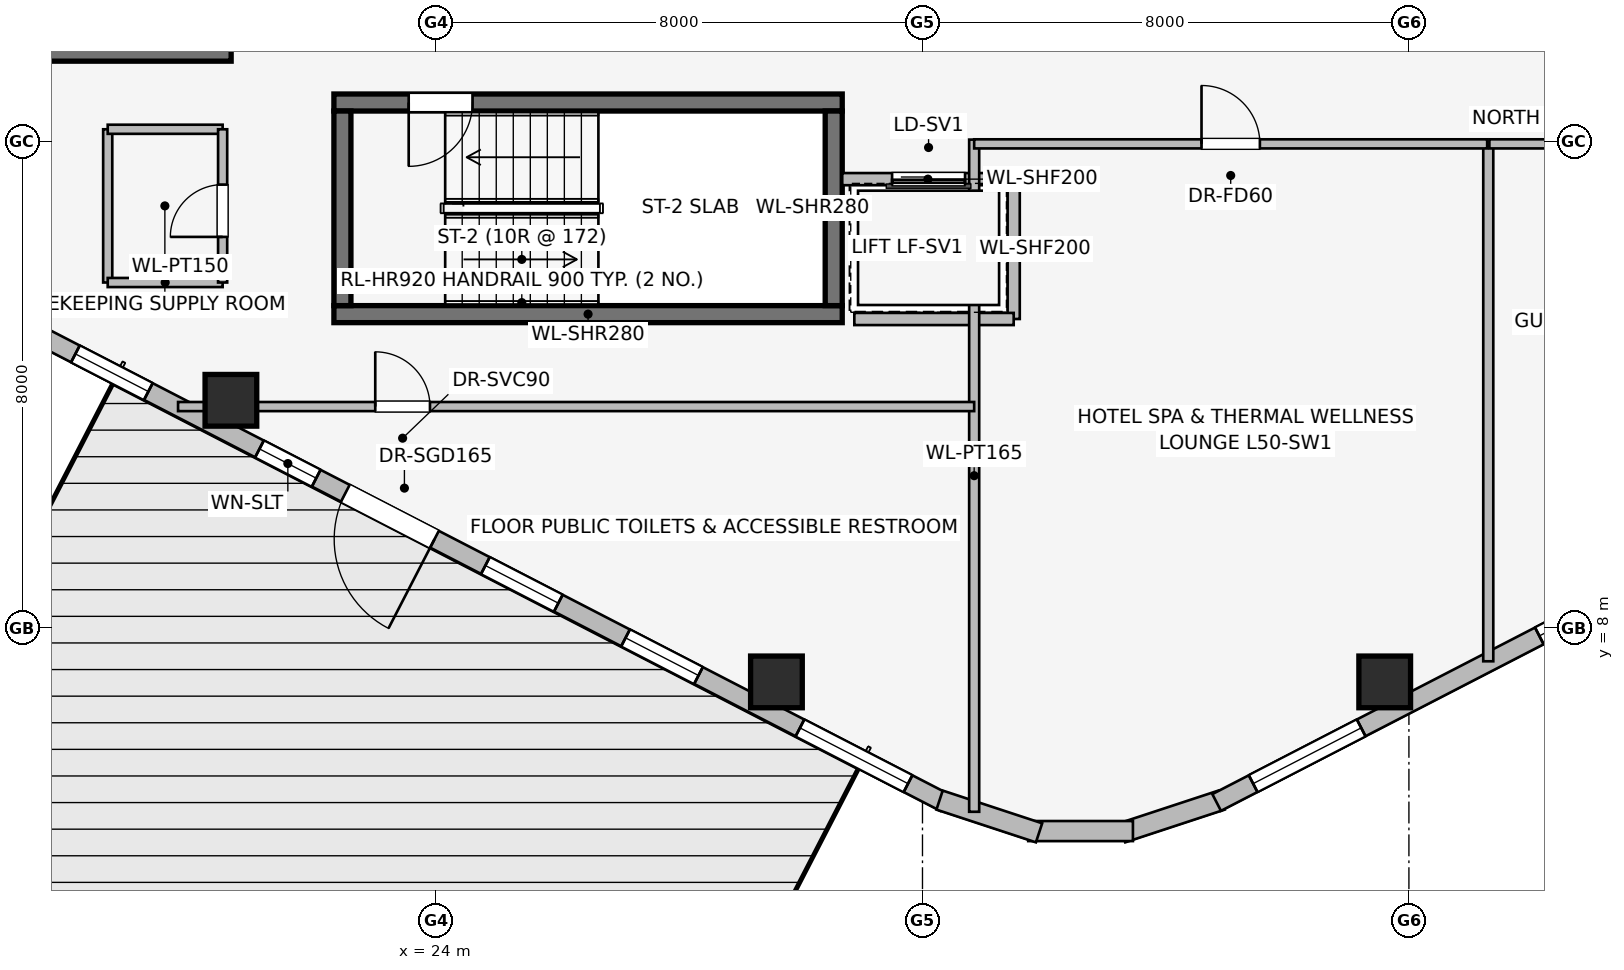
"""IFC4 building model, lengths in metres.
Left out: names, types, materials, properties, quantities, classifications, styles, units other than length and angle.
Written with IfcOpenShell. Run it as: python <this file> out.ifc"""

import sys

from ifc_helpers import new_model, si_unit, direction, frame, frame_2d, origin, origin_2d, place, context, subcontext, project, spatial, rectangle, extrude, element, fill, save


model = new_model("IFC4")
c1 = context("Model", 3, precision=1e-05, world=origin(), true_north=direction((0.0, 1.0)))
c2 = subcontext(c1, "Body", "Model", "MODEL_VIEW")
j1 = project(units=[si_unit("LENGTHUNIT", "METRE"), si_unit("PLANEANGLEUNIT", "RADIAN")], contexts=[c1])
p1 = place(None, origin())
s1 = spatial("IfcSite", under=j1, at=p1, CompositionType="ELEMENT")
p2 = place(p1, origin())
s2 = spatial("IfcBuilding", under=s1, at=p2, CompositionType="ELEMENT")
p3 = place(p2, frame((0.0, 0.0, 184.35)))
s3 = spatial("IfcBuildingStorey", under=s2, at=p3, CompositionType="ELEMENT", Elevation=184.35)
p4 = place(p3, frame((16.87, 17.46, 0.0), z_axis=(0.0, 0.0, 1.0), x_axis=(1.0, 0.0, 0.0)))
e1 = element("IfcWall", 1, at=p4, inside=s3, PredefinedType="SHEAR", context=c2, shape_type="SweptSolid", body=[
    extrude(rectangle(XDim=3.76, YDim=0.28, at=frame_2d((1.88, 0.0))), origin(), (0.0, 0.0, 1.0), 3.45),
])
p5 = place(p3, frame((22.32, 13.16, 0.0), z_axis=(0.0, 0.0, 1.0), x_axis=(1.0, 0.0, 0.0)))
e2 = element("IfcWall", 2, at=p5, inside=s3, PredefinedType="SHEAR", context=c2, shape_type="SweptSolid", body=[
    extrude(rectangle(XDim=8.36, YDim=0.28, at=frame_2d((4.18, 0.0))), origin(), (0.0, 0.0, 1.0), 3.45),
])
p6 = place(p3, frame((30.68, 16.64, 0.0), z_axis=(0.0, 0.0, 1.0), x_axis=(-1.0, 0.0, 0.0)))
e3 = element("IfcWall", 3, at=p6, inside=s3, PredefinedType="SHEAR", context=c2, shape_type="SweptSolid", body=[
    extrude(rectangle(XDim=8.36, YDim=0.28, at=frame_2d((4.18, 0.0))), origin(), (0.0, 0.0, 1.0), 3.45),
])
p7 = place(p6, frame((6.08, 0.0, 0.0)))
e4 = element("IfcOpeningElement", 4, at=p7, cuts=e3, PredefinedType="OPENING", context=c2, shape_type="SweptSolid", body=[
    extrude(rectangle(XDim=1.05, YDim=2.0, at=frame_2d((0.525, 1.0))), frame((0.0, 0.15, 0.0), z_axis=(0.0, -1.0, 0.0), x_axis=(1.0, 0.0, 0.0)), (0.0, 0.0, 1.0), 0.3),
])
for number, where, z_axis, x_axis in (
    (5, (22.46, 16.5, 0.0), (0.0, 0.0, 1.0), (0.0, -1.0, 0.0)),
    (6, (30.54, 13.3, 0.0), (0.0, 0.0, 1.0), (0.0, 1.0, 0.0)),
):
    element("IfcWall", number, at=place(p3, frame(where, z_axis=z_axis, x_axis=x_axis)), inside=s3, PredefinedType="SHEAR", context=c2, shape_type="SweptSolid", body=[
        extrude(rectangle(XDim=3.2, YDim=0.28, at=frame_2d((1.6, 0.0))), origin(), (0.0, 0.0, 1.0), 3.45),
    ])
for number, where, z_axis, x_axis in (
    (7, (20.626, 11.743, 0.0), (0.0, 0.0, 1.0), (1.0, 0.0, 0.0)),
    (8, (29.598, 7.112, 0.0), (0.0, 0.0, 1.0), (1.0, 0.0, 0.0)),
    (9, (39.602, 7.112, 0.0), (0.0, 0.0, 1.0), (1.0, 0.0, 0.0)),
):
    element("IfcColumn", number, at=place(p3, frame(where, z_axis=z_axis, x_axis=x_axis)), inside=s3, PredefinedType="COLUMN", context=c2, shape_type="SweptSolid", body=[
        extrude(rectangle(XDim=0.85, YDim=0.85, at=origin_2d()), origin(), (0.0, 0.0, 1.0), 3.45),
    ])
p8 = place(p3, frame((32.362, 5.129, 0.0), z_axis=(0.0, 0.0, 1.0), x_axis=(-0.888626188278, 0.458632202867, 0.0)))
e10 = element("IfcWall", 10, at=p8, inside=s3, PredefinedType="STANDARD", context=c2, shape_type="SweptSolid", body=[
    extrude(rectangle(XDim=16.828, YDim=0.31, at=frame_2d((8.414, 0.0))), origin(), (0.0, 0.0, 1.0), 2.494),
])
p9 = place(p8, frame((9.439, 0.0, 0.0)))
e11 = element("IfcOpeningElement", 11, at=p9, cuts=e10, PredefinedType="OPENING", context=c2, shape_type="SweptSolid", body=[
    extrude(rectangle(XDim=1.65, YDim=2.25, at=frame_2d((0.825, 1.125))), frame((0.0, 0.165, 0.0), z_axis=(0.0, -1.0, 0.0), x_axis=(1.0, 0.0, 0.0)), (0.0, 0.0, 1.0), 0.33),
])
p10 = place(p8, frame((0.675, 0.0, 0.75)))
e12 = element("IfcOpeningElement", 12, at=p10, cuts=e10, PredefinedType="OPENING", context=c2, shape_type="SweptSolid", body=[
    extrude(rectangle(XDim=2.0, YDim=1.5, at=frame_2d((1.0, 0.75))), frame((0.0, 0.165, 0.0), z_axis=(0.0, -1.0, 0.0), x_axis=(1.0, 0.0, 0.0)), (0.0, 0.0, 1.0), 0.33),
])
p11 = place(p8, frame((4.553, 0.0, 0.75)))
e13 = element("IfcOpeningElement", 13, at=p11, cuts=e10, PredefinedType="OPENING", context=c2, shape_type="SweptSolid", body=[
    extrude(rectangle(XDim=1.35, YDim=1.45, at=frame_2d((0.675, 0.725))), frame((0.0, 0.165, 0.0), z_axis=(0.0, -1.0, 0.0), x_axis=(1.0, 0.0, 0.0)), (0.0, 0.0, 1.0), 0.33),
])
p12 = place(p8, frame((7.147, 0.0, 0.75)))
e14 = element("IfcOpeningElement", 14, at=p12, cuts=e10, PredefinedType="OPENING", context=c2, shape_type="SweptSolid", body=[
    extrude(rectangle(XDim=1.35, YDim=1.45, at=frame_2d((0.675, 0.725))), frame((0.0, 0.165, 0.0), z_axis=(0.0, -1.0, 0.0), x_axis=(1.0, 0.0, 0.0)), (0.0, 0.0, 1.0), 0.33),
])
p13 = place(p8, frame((11.628, 0.0, 0.75)))
e15 = element("IfcOpeningElement", 15, at=p13, cuts=e10, PredefinedType="OPENING", context=c2, shape_type="SweptSolid", body=[
    extrude(rectangle(XDim=1.05, YDim=1.4, at=frame_2d((0.525, 0.7))), frame((0.0, 0.165, 0.0), z_axis=(0.0, -1.0, 0.0), x_axis=(1.0, 0.0, 0.0)), (0.0, 0.0, 1.0), 0.33),
])
p14 = place(p8, frame((14.735, 0.0, 0.75)))
e16 = element("IfcOpeningElement", 16, at=p14, cuts=e10, PredefinedType="OPENING", context=c2, shape_type="SweptSolid", body=[
    extrude(rectangle(XDim=1.35, YDim=1.45, at=frame_2d((0.675, 0.725))), frame((0.0, 0.165, 0.0), z_axis=(0.0, -1.0, 0.0), x_axis=(1.0, 0.0, 0.0)), (0.0, 0.0, 1.0), 0.33),
])
p15 = place(p3, frame((36.919, 5.168, 0.0), z_axis=(0.0, 0.0, 1.0), x_axis=(-0.949937416267, -0.312440242569, 0.0)))
e17 = element("IfcWall", 17, at=p15, inside=s3, PredefinedType="STANDARD", context=c2, shape_type="SweptSolid", body=[
    extrude(rectangle(XDim=1.722, YDim=0.33, at=frame_2d((0.861, 0.0))), origin(), (0.0, 0.0, 1.0), 3.19),
])
p16 = place(p3, frame((35.461, 4.659, 0.0), z_axis=(0.0, 0.0, 1.0), x_axis=(-1.0, 0.0, 0.0)))
e18 = element("IfcWall", 18, at=p16, inside=s3, PredefinedType="STANDARD", context=c2, shape_type="SweptSolid", body=[
    extrude(rectangle(XDim=1.722, YDim=0.33, at=frame_2d((0.861, 0.0))), origin(), (0.0, 0.0, 1.0), 3.19),
])
p17 = place(p3, frame((33.917, 4.63, 0.0), z_axis=(0.0, 0.0, 1.0), x_axis=(-0.949937416267, 0.312440242569, 0.0)))
e19 = element("IfcWall", 19, at=p17, inside=s3, PredefinedType="STANDARD", context=c2, shape_type="SweptSolid", body=[
    extrude(rectangle(XDim=1.722, YDim=0.33, at=frame_2d((0.861, 0.0))), origin(), (0.0, 0.0, 1.0), 3.19),
])
p18 = place(p3, frame((51.792, 12.847, 0.0), z_axis=(0.0, 0.0, 1.0), x_axis=(-0.888626188278, -0.458632202867, 0.0)))
e20 = element("IfcWall", 20, at=p18, inside=s3, PredefinedType="STANDARD", context=c2, shape_type="SweptSolid", body=[
    extrude(rectangle(XDim=16.828, YDim=0.31, at=frame_2d((8.414, 0.0))), origin(), (0.0, 0.0, 1.0), 3.19),
])
p19 = place(p18, frame((0.675, 0.0, 0.75)))
e21 = element("IfcOpeningElement", 21, at=p19, cuts=e20, PredefinedType="OPENING", context=c2, shape_type="SweptSolid", body=[
    extrude(rectangle(XDim=2.0, YDim=1.5, at=frame_2d((1.0, 0.75))), frame((0.0, 0.165, 0.0), z_axis=(0.0, -1.0, 0.0), x_axis=(1.0, 0.0, 0.0)), (0.0, 0.0, 1.0), 0.33),
])
p20 = place(p18, frame((4.506, 0.0, 0.75)))
e22 = element("IfcOpeningElement", 22, at=p20, cuts=e20, PredefinedType="OPENING", context=c2, shape_type="SweptSolid", body=[
    extrude(rectangle(XDim=1.35, YDim=1.45, at=frame_2d((0.675, 0.725))), frame((0.0, 0.165, 0.0), z_axis=(0.0, -1.0, 0.0), x_axis=(1.0, 0.0, 0.0)), (0.0, 0.0, 1.0), 0.33),
])
p21 = place(p18, frame((7.006, 0.0, 0.75)))
e23 = element("IfcOpeningElement", 23, at=p21, cuts=e20, PredefinedType="OPENING", context=c2, shape_type="SweptSolid", body=[
    extrude(rectangle(XDim=1.35, YDim=1.45, at=frame_2d((0.675, 0.725))), frame((0.0, 0.165, 0.0), z_axis=(0.0, -1.0, 0.0), x_axis=(1.0, 0.0, 0.0)), (0.0, 0.0, 1.0), 0.33),
])
p22 = place(p18, frame((9.506, 0.0, 0.75)))
e24 = element("IfcOpeningElement", 24, at=p22, cuts=e20, PredefinedType="OPENING", context=c2, shape_type="SweptSolid", body=[
    extrude(rectangle(XDim=1.35, YDim=1.45, at=frame_2d((0.675, 0.725))), frame((0.0, 0.165, 0.0), z_axis=(0.0, -1.0, 0.0), x_axis=(1.0, 0.0, 0.0)), (0.0, 0.0, 1.0), 0.33),
])
p23 = place(p18, frame((14.153, 0.0, 0.75)))
e25 = element("IfcOpeningElement", 25, at=p23, cuts=e20, PredefinedType="OPENING", context=c2, shape_type="SweptSolid", body=[
    extrude(rectangle(XDim=2.0, YDim=1.5, at=frame_2d((1.0, 0.75))), frame((0.0, 0.165, 0.0), z_axis=(0.0, -1.0, 0.0), x_axis=(1.0, 0.0, 0.0)), (0.0, 0.0, 1.0), 0.33),
])
p24 = place(p3, frame((33.5, 15.38, 0.0), z_axis=(0.0, 0.0, 1.0), x_axis=(-1.0, 0.0, 0.0)))
e26 = element("IfcWall", 26, at=p24, inside=s3, PredefinedType="PARTITIONING", context=c2, shape_type="SweptSolid", body=[
    extrude(rectangle(XDim=2.82, YDim=0.2, at=frame_2d((1.41, 0.0))), origin(), (0.0, 0.0, 1.0), 3.19),
])
p25 = place(p24, frame((0.8, 0.0, 0.0)))
e27 = element("IfcOpeningElement", 27, at=p25, cuts=e26, PredefinedType="OPENING", context=c2, shape_type="SweptSolid", body=[
    extrude(rectangle(XDim=1.2, YDim=2.2, at=frame_2d((0.6, 1.1))), frame((0.0, 0.11, 0.0), z_axis=(0.0, -1.0, 0.0), x_axis=(1.0, 0.0, 0.0)), (0.0, 0.0, 1.0), 0.22),
])
p26 = place(p3, frame((33.5, 13.08, 0.0), z_axis=(0.0, 0.0, 1.0), x_axis=(0.0, 1.0, 0.0)))
e28 = element("IfcWall", 28, at=p26, inside=s3, PredefinedType="PARTITIONING", context=c2, shape_type="SweptSolid", body=[
    extrude(rectangle(XDim=2.3, YDim=0.2, at=frame_2d((1.15, 0.0))), origin(), (0.0, 0.0, 1.0), 3.19),
])
p27 = place(p3, frame((30.879, 13.08, 0.0), z_axis=(0.0, 0.0, 1.0), x_axis=(1.0, 0.0, 0.0)))
e29 = element("IfcWall", 29, at=p27, inside=s3, PredefinedType="PARTITIONING", context=c2, shape_type="SweptSolid", body=[
    extrude(rectangle(XDim=2.621, YDim=0.2, at=frame_2d((1.311, 0.0))), origin(), (0.0, 0.0, 1.0), 3.19),
])
p28 = place(p3, frame((18.6, 16.2, 0.0), z_axis=(0.0, 0.0, 1.0), x_axis=(0.0, -1.0, 0.0)))
e30 = element("IfcWall", 30, at=p28, inside=s3, PredefinedType="PARTITIONING", context=c2, shape_type="SweptSolid", body=[
    extrude(rectangle(XDim=2.52, YDim=0.15, at=frame_2d((1.26, 0.0))), origin(), (0.0, 0.0, 1.0), 3.19),
])
for number, where, z_axis, x_axis in (
    (31, (18.6, 13.68, 0.0), (0.0, 0.0, 1.0), (1.0, 0.0, 0.0)),
    (32, (18.6, 16.2, 0.0), (0.0, 0.0, 1.0), (1.0, 0.0, 0.0)),
):
    element("IfcWall", number, at=place(p3, frame(where, z_axis=z_axis, x_axis=x_axis)), inside=s3, PredefinedType="PARTITIONING", context=c2, shape_type="SweptSolid", body=[
        extrude(rectangle(XDim=1.89, YDim=0.15, at=frame_2d((0.945, 0.0))), origin(), (0.0, 0.0, 1.0), 3.19),
    ])
p29 = place(p3, frame((20.49, 13.68, 0.0), z_axis=(0.0, 0.0, 1.0), x_axis=(0.0, 1.0, 0.0)))
e33 = element("IfcWall", 33, at=p29, inside=s3, PredefinedType="PARTITIONING", context=c2, shape_type="SweptSolid", body=[
    extrude(rectangle(XDim=2.52, YDim=0.15, at=frame_2d((1.26, 0.0))), origin(), (0.0, 0.0, 1.0), 3.19),
])
p30 = place(p29, frame((0.75, 0.0, 0.0)))
e34 = element("IfcOpeningElement", 34, at=p30, cuts=e33, PredefinedType="OPENING", context=c2, shape_type="SweptSolid", body=[
    extrude(rectangle(XDim=0.86, YDim=2.0, at=frame_2d((0.43, 1.0))), frame((0.0, 0.085, 0.0), z_axis=(0.0, -1.0, 0.0), x_axis=(1.0, 0.0, 0.0)), (0.0, 0.0, 1.0), 0.17),
])
p31 = place(p3, frame((32.85, 4.976, 0.0), z_axis=(0.0, 0.0, 1.0), x_axis=(0.0, 1.0, 0.0)))
e35 = element("IfcWall", 35, at=p31, inside=s3, PredefinedType="PARTITIONING", context=c2, shape_type="SweptSolid", body=[
    extrude(rectangle(XDim=11.054, YDim=0.165, at=frame_2d((5.527, 0.0))), origin(), (0.0, 0.0, 1.0), 3.19),
])
p32 = place(p3, frame((19.757, 11.64, 0.0), z_axis=(0.0, 0.0, 1.0), x_axis=(1.0, 0.0, 0.0)))
e36 = element("IfcWall", 36, at=p32, inside=s3, PredefinedType="PARTITIONING", context=c2, shape_type="SweptSolid", body=[
    extrude(rectangle(XDim=13.093, YDim=0.15, at=frame_2d((6.546, 0.0))), origin(), (0.0, 0.0, 1.0), 3.19),
])
p33 = place(p32, frame((3.243, 0.0, 0.0)))
e37 = element("IfcOpeningElement", 37, at=p33, cuts=e36, PredefinedType="OPENING", context=c2, shape_type="SweptSolid", body=[
    extrude(rectangle(XDim=0.9, YDim=2.0, at=frame_2d((0.45, 1.0))), frame((0.0, 0.085, 0.0), z_axis=(0.0, -1.0, 0.0), x_axis=(1.0, 0.0, 0.0)), (0.0, 0.0, 1.0), 0.17),
])
p34 = place(p3, frame((41.305, 7.451, 0.0), z_axis=(0.0, 0.0, 1.0), x_axis=(0.0, 1.0, 0.0)))
e38 = element("IfcWall", 38, at=p34, inside=s3, PredefinedType="PARTITIONING", context=c2, shape_type="SweptSolid", body=[
    extrude(rectangle(XDim=8.479, YDim=0.165, at=frame_2d((4.24, 0.0))), origin(), (0.0, 0.0, 1.0), 3.19),
])
p35 = place(p3, frame((32.85, 15.96, 0.0), z_axis=(0.0, 0.0, 1.0), x_axis=(1.0, 0.0, 0.0)))
e39 = element("IfcWall", 39, at=p35, inside=s3, PredefinedType="PARTITIONING", context=c2, shape_type="SweptSolid", body=[
    extrude(rectangle(XDim=8.437, YDim=0.15, at=frame_2d((4.219, 0.0))), origin(), (0.0, 0.0, 1.0), 3.19),
])
p36 = place(p35, frame((3.739, 0.0, 0.0)))
e40 = element("IfcOpeningElement", 40, at=p36, cuts=e39, PredefinedType="OPENING", context=c2, shape_type="SweptSolid", body=[
    extrude(rectangle(XDim=0.96, YDim=2.0, at=frame_2d((0.48, 1.0))), frame((0.0, 0.085, 0.0), z_axis=(0.0, -1.0, 0.0), x_axis=(1.0, 0.0, 0.0)), (0.0, 0.0, 1.0), 0.17),
])
p37 = place(p3, frame((41.323, 15.96, 0.0), z_axis=(0.0, 0.0, 1.0), x_axis=(1.0, 0.0, 0.0)))
e41 = element("IfcWall", 41, at=p37, inside=s3, PredefinedType="PARTITIONING", context=c2, shape_type="SweptSolid", body=[
    extrude(rectangle(XDim=12.74, YDim=0.15, at=frame_2d((6.37, 0.0))), origin(), (0.0, 0.0, 1.0), 3.19),
])
p38 = place(p37, frame((5.959, 0.0, 0.0)))
e42 = element("IfcOpeningElement", 42, at=p38, cuts=e41, PredefinedType="OPENING", context=c2, shape_type="SweptSolid", body=[
    extrude(rectangle(XDim=0.96, YDim=2.0, at=frame_2d((0.48, 1.0))), frame((0.0, 0.085, 0.0), z_axis=(0.0, -1.0, 0.0), x_axis=(1.0, 0.0, 0.0)), (0.0, 0.0, 1.0), 0.17),
])
p39 = place(p9, origin())
e43 = element("IfcDoor", 43, at=p39, inside=s3, OperationType="SINGLE_SWING_LEFT", PredefinedType="DOOR", context=c2, shape_type="SweptSolid", body=[
    extrude(rectangle(XDim=1.65, YDim=2.25, at=frame_2d((0.825, 1.125))), frame((0.0, 0.025, 0.0), z_axis=(0.0, -1.0, 0.0), x_axis=(1.0, 0.0, 0.0)), (0.0, 0.0, 1.0), 0.05),
])
fill(e11, e43)
p40 = place(p10, origin())
e44 = element("IfcWindow", 44, at=p40, inside=s3, PartitioningType="SINGLE_PANEL", PredefinedType="WINDOW", context=c2, shape_type="SweptSolid", body=[
    extrude(rectangle(XDim=2.0, YDim=1.5, at=frame_2d((1.0, 0.75))), frame((0.0, 0.03, 0.0), z_axis=(0.0, -1.0, 0.0), x_axis=(1.0, 0.0, 0.0)), (0.0, 0.0, 1.0), 0.06),
])
fill(e12, e44)
p41 = place(p11, origin())
e45 = element("IfcWindow", 45, at=p41, inside=s3, PartitioningType="SINGLE_PANEL", PredefinedType="WINDOW", context=c2, shape_type="SweptSolid", body=[
    extrude(rectangle(XDim=1.35, YDim=1.45, at=frame_2d((0.675, 0.725))), frame((0.0, 0.03, 0.0), z_axis=(0.0, -1.0, 0.0), x_axis=(1.0, 0.0, 0.0)), (0.0, 0.0, 1.0), 0.06),
])
fill(e13, e45)
p42 = place(p12, origin())
e46 = element("IfcWindow", 46, at=p42, inside=s3, PartitioningType="SINGLE_PANEL", PredefinedType="WINDOW", context=c2, shape_type="SweptSolid", body=[
    extrude(rectangle(XDim=1.35, YDim=1.45, at=frame_2d((0.675, 0.725))), frame((0.0, 0.03, 0.0), z_axis=(0.0, -1.0, 0.0), x_axis=(1.0, 0.0, 0.0)), (0.0, 0.0, 1.0), 0.06),
])
fill(e14, e46)
p43 = place(p13, origin())
e47 = element("IfcWindow", 47, at=p43, inside=s3, PartitioningType="SINGLE_PANEL", PredefinedType="WINDOW", context=c2, shape_type="SweptSolid", body=[
    extrude(rectangle(XDim=1.05, YDim=1.4, at=frame_2d((0.525, 0.7))), frame((0.0, 0.03, 0.0), z_axis=(0.0, -1.0, 0.0), x_axis=(1.0, 0.0, 0.0)), (0.0, 0.0, 1.0), 0.06),
])
fill(e15, e47)
p44 = place(p14, origin())
e48 = element("IfcWindow", 48, at=p44, inside=s3, PartitioningType="SINGLE_PANEL", PredefinedType="WINDOW", context=c2, shape_type="SweptSolid", body=[
    extrude(rectangle(XDim=1.35, YDim=1.45, at=frame_2d((0.675, 0.725))), frame((0.0, 0.03, 0.0), z_axis=(0.0, -1.0, 0.0), x_axis=(1.0, 0.0, 0.0)), (0.0, 0.0, 1.0), 0.06),
])
fill(e16, e48)
p45 = place(p22, origin())
e49 = element("IfcWindow", 49, at=p45, inside=s3, PartitioningType="SINGLE_PANEL", PredefinedType="WINDOW", context=c2, shape_type="SweptSolid", body=[
    extrude(rectangle(XDim=1.35, YDim=1.45, at=frame_2d((0.675, 0.725))), frame((0.0, 0.03, 0.0), z_axis=(0.0, -1.0, 0.0), x_axis=(1.0, 0.0, 0.0)), (0.0, 0.0, 1.0), 0.06),
])
fill(e24, e49)
p46 = place(p23, origin())
e50 = element("IfcWindow", 50, at=p46, inside=s3, PartitioningType="SINGLE_PANEL", PredefinedType="WINDOW", context=c2, shape_type="SweptSolid", body=[
    extrude(rectangle(XDim=2.0, YDim=1.5, at=frame_2d((1.0, 0.75))), frame((0.0, 0.03, 0.0), z_axis=(0.0, -1.0, 0.0), x_axis=(1.0, 0.0, 0.0)), (0.0, 0.0, 1.0), 0.06),
])
fill(e25, e50)
p47 = place(p7, origin())
e51 = element("IfcDoor", 51, at=p47, inside=s3, OperationType="SINGLE_SWING_RIGHT", PredefinedType="DOOR", context=c2, shape_type="SweptSolid", body=[
    extrude(rectangle(XDim=1.05, YDim=2.0, at=frame_2d((0.525, 1.0))), frame((0.0, 0.025, 0.0), z_axis=(0.0, -1.0, 0.0), x_axis=(1.0, 0.0, 0.0)), (0.0, 0.0, 1.0), 0.05),
])
fill(e4, e51)
p48 = place(p25, origin())
e52 = element("IfcDoor", 52, at=p48, inside=s3, OperationType="SLIDING_TO_RIGHT", PredefinedType="DOOR", context=c2, shape_type="SweptSolid", body=[
    extrude(rectangle(XDim=1.2, YDim=2.2, at=frame_2d((0.6, 1.1))), frame((0.0, 0.025, 0.0), z_axis=(0.0, -1.0, 0.0), x_axis=(1.0, 0.0, 0.0)), (0.0, 0.0, 1.0), 0.05),
])
fill(e27, e52)
p49 = place(p30, origin())
e53 = element("IfcDoor", 53, at=p49, inside=s3, OperationType="SINGLE_SWING_LEFT", PredefinedType="DOOR", context=c2, shape_type="SweptSolid", body=[
    extrude(rectangle(XDim=0.86, YDim=2.0, at=frame_2d((0.43, 1.0))), frame((0.0, 0.025, 0.0), z_axis=(0.0, -1.0, 0.0), x_axis=(1.0, 0.0, 0.0)), (0.0, 0.0, 1.0), 0.05),
])
fill(e34, e53)
p50 = place(p33, origin())
e54 = element("IfcDoor", 54, at=p50, inside=s3, OperationType="SINGLE_SWING_LEFT", PredefinedType="DOOR", context=c2, shape_type="SweptSolid", body=[
    extrude(rectangle(XDim=0.9, YDim=2.0, at=frame_2d((0.45, 1.0))), frame((0.0, 0.025, 0.0), z_axis=(0.0, -1.0, 0.0), x_axis=(1.0, 0.0, 0.0)), (0.0, 0.0, 1.0), 0.05),
])
fill(e37, e54)
p51 = place(p36, origin())
e55 = element("IfcDoor", 55, at=p51, inside=s3, OperationType="SINGLE_SWING_LEFT", PredefinedType="DOOR", context=c2, shape_type="SweptSolid", body=[
    extrude(rectangle(XDim=0.96, YDim=2.0, at=frame_2d((0.48, 1.0))), frame((0.0, 0.025, 0.0), z_axis=(0.0, -1.0, 0.0), x_axis=(1.0, 0.0, 0.0)), (0.0, 0.0, 1.0), 0.05),
])
fill(e40, e55)
save(model, sys.argv[1])
